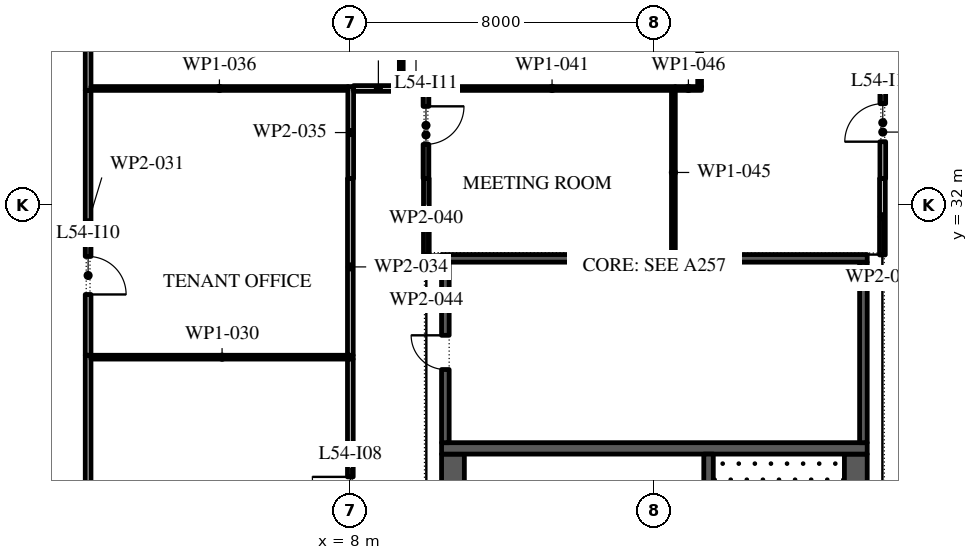
"""IFC4 building model, lengths in metres.
Left out: names, types, materials, properties, quantities, classifications, styles, units other than length and angle.
Written with IfcOpenShell. Run it as: python <this file> out.ifc"""

import sys

from ifc_helpers import new_model, si_unit, direction, frame, frame_2d, origin, place, context, subcontext, project, spatial, rectangle, extrude, element, fill, save


model = new_model("IFC4")
c1 = context("Model", 3, precision=1e-05, world=origin(), true_north=direction((0.0, 1.0)))
c2 = subcontext(c1, "Body", "Model", "MODEL_VIEW")
j1 = project(units=[si_unit("LENGTHUNIT", "METRE"), si_unit("PLANEANGLEUNIT", "RADIAN")], contexts=[c1])
p1 = place(None, origin())
s1 = spatial("IfcSite", under=j1, at=p1, CompositionType="ELEMENT")
p2 = place(p1, origin())
s2 = spatial("IfcBuilding", under=s1, at=p2, CompositionType="ELEMENT")
p3 = place(p2, frame((0.0, 0.0, 251.4)))
s3 = spatial("IfcBuildingStorey", under=s2, at=p3, CompositionType="ELEMENT", Elevation=251.4)
p4 = place(p3, frame((21.359, -11.678, 0.0), z_axis=(0.0, 0.0, 1.0), x_axis=(0.224949198343, 0.974370493275, 0.0)))
e1 = element("IfcWall", 1, at=p4, inside=s3, PredefinedType="STANDARD", context=c2, shape_type="SweptSolid", body=[
    extrude(rectangle(XDim=49.5, YDim=0.3, at=frame_2d((24.75, 0.0))), origin(), (0.0, 0.0, 1.0), 4.0),
])
p5 = place(p4, frame((1.157, 0.0, 0.45)))
e2 = element("IfcOpeningElement", 2, at=p5, cuts=e1, PredefinedType="OPENING", context=c2, shape_type="SweptSolid", body=[
    extrude(rectangle(XDim=4.5, YDim=3.05, at=frame_2d((2.25, 1.525))), frame((0.0, 0.16, 0.0), z_axis=(0.0, -1.0, 0.0), x_axis=(1.0, 0.0, 0.0)), (0.0, 0.0, 1.0), 0.32),
])
p6 = place(p4, frame((8.121, 0.0, 0.45)))
e3 = element("IfcOpeningElement", 3, at=p6, cuts=e1, PredefinedType="OPENING", context=c2, shape_type="SweptSolid", body=[
    extrude(rectangle(XDim=4.5, YDim=3.05, at=frame_2d((2.25, 1.525))), frame((0.0, 0.16, 0.0), z_axis=(0.0, -1.0, 0.0), x_axis=(1.0, 0.0, 0.0)), (0.0, 0.0, 1.0), 0.32),
])
p7 = place(p4, frame((15.236, 0.0, 0.45)))
e4 = element("IfcOpeningElement", 4, at=p7, cuts=e1, PredefinedType="OPENING", context=c2, shape_type="SweptSolid", body=[
    extrude(rectangle(XDim=4.5, YDim=3.05, at=frame_2d((2.25, 1.525))), frame((0.0, 0.16, 0.0), z_axis=(0.0, -1.0, 0.0), x_axis=(1.0, 0.0, 0.0)), (0.0, 0.0, 1.0), 0.32),
])
p8 = place(p4, frame((22.35, 0.0, 0.45)))
e5 = element("IfcOpeningElement", 5, at=p8, cuts=e1, PredefinedType="OPENING", context=c2, shape_type="SweptSolid", body=[
    extrude(rectangle(XDim=4.5, YDim=3.05, at=frame_2d((2.25, 1.525))), frame((0.0, 0.16, 0.0), z_axis=(0.0, -1.0, 0.0), x_axis=(1.0, 0.0, 0.0)), (0.0, 0.0, 1.0), 0.32),
])
p9 = place(p4, frame((29.464, 0.0, 0.45)))
e6 = element("IfcOpeningElement", 6, at=p9, cuts=e1, PredefinedType="OPENING", context=c2, shape_type="SweptSolid", body=[
    extrude(rectangle(XDim=4.5, YDim=2.95, at=frame_2d((2.25, 1.475))), frame((0.0, 0.16, 0.0), z_axis=(0.0, -1.0, 0.0), x_axis=(1.0, 0.0, 0.0)), (0.0, 0.0, 1.0), 0.32),
])
p10 = place(p4, frame((37.628, 0.0, 0.0)))
e7 = element("IfcOpeningElement", 7, at=p10, cuts=e1, PredefinedType="OPENING", context=c2, shape_type="SweptSolid", body=[
    extrude(rectangle(XDim=2.4, YDim=3.325, at=frame_2d((1.2, 1.663))), frame((0.0, 0.16, 0.0), z_axis=(0.0, -1.0, 0.0), x_axis=(1.0, 0.0, 0.0)), (0.0, 0.0, 1.0), 0.32),
])
p11 = place(p4, frame((43.693, 0.0, 0.45)))
e8 = element("IfcOpeningElement", 8, at=p11, cuts=e1, PredefinedType="OPENING", context=c2, shape_type="SweptSolid", body=[
    extrude(rectangle(XDim=4.5, YDim=3.05, at=frame_2d((2.25, 1.525))), frame((0.0, 0.16, 0.0), z_axis=(0.0, -1.0, 0.0), x_axis=(1.0, 0.0, 0.0)), (0.0, 0.0, 1.0), 0.32),
])
p12 = place(p3, frame((21.3, -2.45, 0.0), z_axis=(0.0, 0.0, 1.0), x_axis=(0.0, 1.0, 0.0)))
e9 = element("IfcWall", 9, at=p12, inside=s3, PredefinedType="SHEAR", context=c2, shape_type="SweptSolid", body=[
    extrude(rectangle(XDim=27.9, YDim=0.6, at=frame_2d((13.95, 0.0))), origin(), (0.0, 0.0, 1.0), 4.0),
])
p13 = place(p12, frame((5.05, 0.0, 0.0)))
e10 = element("IfcOpeningElement", 10, at=p13, cuts=e9, PredefinedType="OPENING", context=c2, shape_type="SweptSolid", body=[
    extrude(rectangle(XDim=1.2, YDim=2.1, at=frame_2d((0.6, 1.05))), frame((0.0, 0.31, 0.0), z_axis=(0.0, -1.0, 0.0), x_axis=(1.0, 0.0, 0.0)), (0.0, 0.0, 1.0), 0.62),
])
p14 = place(p12, frame((21.65, 0.0, 0.0)))
e11 = element("IfcOpeningElement", 11, at=p14, cuts=e9, PredefinedType="OPENING", context=c2, shape_type="SweptSolid", body=[
    extrude(rectangle(XDim=1.2, YDim=2.1, at=frame_2d((0.6, 1.05))), frame((0.0, 0.31, 0.0), z_axis=(0.0, -1.0, 0.0), x_axis=(1.0, 0.0, 0.0)), (0.0, 0.0, 1.0), 0.62),
])
p15 = place(p3, frame((10.7, -2.45, 0.0), z_axis=(0.0, 0.0, 1.0), x_axis=(0.0, 1.0, 0.0)))
e12 = element("IfcWall", 12, at=p15, inside=s3, PredefinedType="SHEAR", context=c2, shape_type="SweptSolid", body=[
    extrude(rectangle(XDim=27.9, YDim=0.6, at=frame_2d((13.95, 0.0))), origin(), (0.0, 0.0, 1.0), 4.0),
])
p16 = place(p15, frame((23.65, 0.0, 0.0)))
e13 = element("IfcOpeningElement", 13, at=p16, cuts=e12, PredefinedType="OPENING", context=c2, shape_type="SweptSolid", body=[
    extrude(rectangle(XDim=2.4, YDim=2.1, at=frame_2d((1.2, 1.05))), frame((0.0, 0.31, 0.0), z_axis=(0.0, -1.0, 0.0), x_axis=(1.0, 0.0, 0.0)), (0.0, 0.0, 1.0), 0.62),
])
p17 = place(p15, frame((0.788, 0.0, 0.0)))
e14 = element("IfcOpeningElement", 14, at=p17, cuts=e12, PredefinedType="OPENING", context=c2, shape_type="SweptSolid", body=[
    extrude(rectangle(XDim=0.9, YDim=2.1, at=frame_2d((0.45, 1.05))), frame((0.0, 0.31, 0.0), z_axis=(0.0, -1.0, 0.0), x_axis=(1.0, 0.0, 0.0)), (0.0, 0.0, 1.0), 0.62),
])
p18 = place(p15, frame((3.962, 0.0, 0.0)))
e15 = element("IfcOpeningElement", 15, at=p18, cuts=e12, PredefinedType="OPENING", context=c2, shape_type="SweptSolid", body=[
    extrude(rectangle(XDim=1.0, YDim=2.1, at=frame_2d((0.5, 1.05))), frame((0.0, 0.31, 0.0), z_axis=(0.0, -1.0, 0.0), x_axis=(1.0, 0.0, 0.0)), (0.0, 0.0, 1.0), 0.62),
])
p19 = place(p3, frame((10.4, 25.6, 0.0), z_axis=(0.0, 0.0, 1.0), x_axis=(1.0, 0.0, 0.0)))
e16 = element("IfcWall", 16, at=p19, inside=s3, PredefinedType="SHEAR", context=c2, shape_type="SweptSolid", body=[
    extrude(rectangle(XDim=11.2, YDim=0.3, at=frame_2d((5.6, 0.0))), origin(), (0.0, 0.0, 1.0), 4.0),
])
p20 = place(p3, frame((17.425, 19.15, 0.0), z_axis=(0.0, 0.0, 1.0), x_axis=(0.0, 1.0, 0.0)))
e17 = element("IfcWall", 17, at=p20, inside=s3, PredefinedType="SHEAR", context=c2, shape_type="SweptSolid", body=[
    extrude(rectangle(XDim=6.3, YDim=0.25, at=frame_2d((3.15, 0.0))), origin(), (0.0, 0.0, 1.0), 4.0),
])
p21 = place(p20, frame((0.05, 0.0, 0.0)))
e18 = element("IfcOpeningElement", 18, at=p21, cuts=e17, PredefinedType="OPENING", context=c2, shape_type="SweptSolid", body=[
    extrude(rectangle(XDim=1.2, YDim=2.1, at=frame_2d((0.6, 1.05))), frame((0.0, 0.135, 0.0), z_axis=(0.0, -1.0, 0.0), x_axis=(1.0, 0.0, 0.0)), (0.0, 0.0, 1.0), 0.27),
])
p22 = place(p3, frame((21.5, 25.75, 0.0), z_axis=(0.0, 0.0, 1.0), x_axis=(0.0, 1.0, 0.0)))
e19 = element("IfcWall", 19, at=p22, inside=s3, PredefinedType="SHEAR", context=c2, shape_type="SweptSolid", body=[
    extrude(rectangle(XDim=4.75, YDim=0.2, at=frame_2d((2.375, 0.0))), origin(), (0.0, 0.0, 1.0), 4.0),
])
p23 = place(p3, frame((10.5, 25.75, 0.0), z_axis=(0.0, 0.0, 1.0), x_axis=(0.0, 1.0, 0.0)))
e20 = element("IfcWall", 20, at=p23, inside=s3, PredefinedType="SHEAR", context=c2, shape_type="SweptSolid", body=[
    extrude(rectangle(XDim=4.75, YDim=0.2, at=frame_2d((2.375, 0.0))), origin(), (0.0, 0.0, 1.0), 4.0),
])
p24 = place(p23, frame((1.925, 0.0, 0.0)))
e21 = element("IfcOpeningElement", 21, at=p24, cuts=e20, PredefinedType="OPENING", context=c2, shape_type="SweptSolid", body=[
    extrude(rectangle(XDim=0.9, YDim=2.1, at=frame_2d((0.45, 1.05))), frame((0.0, 0.11, 0.0), z_axis=(0.0, -1.0, 0.0), x_axis=(1.0, 0.0, 0.0)), (0.0, 0.0, 1.0), 0.22),
])
p25 = place(p3, frame((10.4, 30.6, 0.0), z_axis=(0.0, 0.0, 1.0), x_axis=(1.0, 0.0, 0.0)))
e22 = element("IfcWall", 22, at=p25, inside=s3, PredefinedType="SHEAR", context=c2, shape_type="SweptSolid", body=[
    extrude(rectangle(XDim=11.2, YDim=0.2, at=frame_2d((5.6, 0.0))), origin(), (0.0, 0.0, 1.0), 4.0),
])
p26 = place(p3, frame((1.1, 28.05, 0.0), z_axis=(0.0, 0.0, 1.0), x_axis=(0.0, -1.0, 0.0)))
e23 = element("IfcWall", 23, at=p26, inside=s3, PredefinedType="PARTITIONING", context=c2, shape_type="SweptSolid", body=[
    extrude(rectangle(XDim=8.975, YDim=0.15, at=frame_2d((4.488, 0.0))), origin(), (0.0, 0.0, 1.0), 4.0),
])
p27 = place(p3, frame((1.175, 28.0, 0.0), z_axis=(0.0, 0.0, 1.0), x_axis=(1.0, 0.0, 0.0)))
e24 = element("IfcWall", 24, at=p27, inside=s3, PredefinedType="PARTITIONING", context=c2, shape_type="SweptSolid", body=[
    extrude(rectangle(XDim=6.9, YDim=0.1, at=frame_2d((3.45, 0.0))), origin(), (0.0, 0.0, 1.0), 4.0),
])
p28 = place(p3, frame((1.1, 35.02, 0.0), z_axis=(0.0, 0.0, 1.0), x_axis=(0.0, -1.0, 0.0)))
e25 = element("IfcWall", 25, at=p28, inside=s3, PredefinedType="PARTITIONING", context=c2, shape_type="SweptSolid", body=[
    extrude(rectangle(XDim=6.97, YDim=0.15, at=frame_2d((3.485, 0.0))), origin(), (0.0, 0.0, 1.0), 4.0),
])
p29 = place(p28, frame((4.37, 0.0, 0.0)))
e26 = element("IfcOpeningElement", 26, at=p29, cuts=e25, PredefinedType="OPENING", context=c2, shape_type="SweptSolid", body=[
    extrude(rectangle(XDim=1.0, YDim=2.1, at=frame_2d((0.5, 1.05))), frame((0.0, 0.085, 0.0), z_axis=(0.0, -1.0, 0.0), x_axis=(1.0, 0.0, 0.0)), (0.0, 0.0, 1.0), 0.17),
])
p30 = place(p3, frame((1.1, 47.27, 0.0), z_axis=(0.0, 0.0, 1.0), x_axis=(0.0, -1.0, 0.0)))
e27 = element("IfcWall", 27, at=p30, inside=s3, PredefinedType="PARTITIONING", context=c2, shape_type="SweptSolid", body=[
    extrude(rectangle(XDim=12.25, YDim=0.15, at=frame_2d((6.125, 0.0))), origin(), (0.0, 0.0, 1.0), 4.0),
])
p31 = place(p30, frame((8.05, 0.0, 0.0)))
e28 = element("IfcOpeningElement", 28, at=p31, cuts=e27, PredefinedType="OPENING", context=c2, shape_type="SweptSolid", body=[
    extrude(rectangle(XDim=1.0, YDim=2.1, at=frame_2d((0.5, 1.05))), frame((0.0, 0.085, 0.0), z_axis=(0.0, -1.0, 0.0), x_axis=(1.0, 0.0, 0.0)), (0.0, 0.0, 1.0), 0.17),
])
p32 = place(p3, frame((8.0, 19.075, 0.0), z_axis=(0.0, 0.0, 1.0), x_axis=(0.0, 1.0, 0.0)))
e29 = element("IfcWall", 29, at=p32, inside=s3, PredefinedType="PARTITIONING", context=c2, shape_type="SweptSolid", body=[
    extrude(rectangle(XDim=8.875, YDim=0.15, at=frame_2d((4.438, 0.0))), origin(), (0.0, 0.0, 1.0), 4.0),
])
p33 = place(p32, frame((4.775, 0.0, 0.0)))
e30 = element("IfcOpeningElement", 30, at=p33, cuts=e29, PredefinedType="OPENING", context=c2, shape_type="SweptSolid", body=[
    extrude(rectangle(XDim=1.0, YDim=2.1, at=frame_2d((0.5, 1.05))), frame((0.0, 0.085, 0.0), z_axis=(0.0, -1.0, 0.0), x_axis=(1.0, 0.0, 0.0)), (0.0, 0.0, 1.0), 0.17),
])
p34 = place(p3, frame((8.0, 28.05, 0.0), z_axis=(0.0, 0.0, 1.0), x_axis=(0.0, 1.0, 0.0)))
e31 = element("IfcWall", 31, at=p34, inside=s3, PredefinedType="PARTITIONING", context=c2, shape_type="SweptSolid", body=[
    extrude(rectangle(XDim=4.65, YDim=0.15, at=frame_2d((2.325, 0.0))), origin(), (0.0, 0.0, 1.0), 4.0),
])
p35 = place(p3, frame((8.01, 32.7, 0.0), z_axis=(0.0, 0.0, 1.0), x_axis=(0.0, 1.0, 0.0)))
e32 = element("IfcWall", 32, at=p35, inside=s3, PredefinedType="PARTITIONING", context=c2, shape_type="SweptSolid", body=[
    extrude(rectangle(XDim=2.42, YDim=0.15, at=frame_2d((1.21, 0.0))), origin(), (0.0, 0.0, 1.0), 4.0),
])
p36 = place(p3, frame((7.935, 35.07, 0.0), z_axis=(0.0, 0.0, 1.0), x_axis=(-1.0, 0.0, 0.0)))
e33 = element("IfcWall", 33, at=p36, inside=s3, PredefinedType="PARTITIONING", context=c2, shape_type="SweptSolid", body=[
    extrude(rectangle(XDim=6.76, YDim=0.1, at=frame_2d((3.38, 0.0))), origin(), (0.0, 0.0, 1.0), 4.0),
])
p37 = place(p3, frame((8.085, 35.07, 0.0), z_axis=(0.0, 0.0, 1.0), x_axis=(1.0, 0.0, 0.0)))
e34 = element("IfcWall", 34, at=p37, inside=s3, PredefinedType="PARTITIONING", context=c2, shape_type="SweptSolid", body=[
    extrude(rectangle(XDim=1.305, YDim=0.15, at=frame_2d((0.652, 0.0))), origin(), (0.0, 0.0, 1.0), 4.0),
])
p38 = place(p3, frame((9.39, 35.07, 0.0), z_axis=(0.0, 0.0, 1.0), x_axis=(1.0, 0.0, 0.0)))
e35 = element("IfcWall", 35, at=p38, inside=s3, PredefinedType="PARTITIONING", context=c2, shape_type="SweptSolid", body=[
    extrude(rectangle(XDim=0.675, YDim=0.15, at=frame_2d((0.337, 0.0))), origin(), (0.0, 0.0, 1.0), 4.0),
])
p39 = place(p3, frame((9.34, 45.368, 0.0), z_axis=(0.0, 0.0, 1.0), x_axis=(0.0, -1.0, 0.0)))
e36 = element("IfcWall", 36, at=p39, inside=s3, PredefinedType="PARTITIONING", context=c2, shape_type="SweptSolid", body=[
    extrude(rectangle(XDim=10.223, YDim=0.1, at=frame_2d((5.111, 0.0))), origin(), (0.0, 0.0, 1.0), 4.0),
])
p40 = place(p39, frame((6.698, 0.0, 0.0)))
e37 = element("IfcOpeningElement", 37, at=p40, cuts=e36, PredefinedType="OPENING", context=c2, shape_type="SweptSolid", body=[
    extrude(rectangle(XDim=0.9, YDim=2.1, at=frame_2d((0.45, 1.05))), frame((0.0, 0.06, 0.0), z_axis=(0.0, -1.0, 0.0), x_axis=(1.0, 0.0, 0.0)), (0.0, 0.0, 1.0), 0.12),
])
p41 = place(p3, frame((9.99, 34.995, 0.0), z_axis=(0.0, 0.0, 1.0), x_axis=(0.0, -1.0, 0.0)))
e38 = element("IfcWall", 38, at=p41, inside=s3, PredefinedType="PARTITIONING", context=c2, shape_type="SweptSolid", body=[
    extrude(rectangle(XDim=2.295, YDim=0.15, at=frame_2d((1.147, 0.0))), origin(), (0.0, 0.0, 1.0), 4.0),
])
p42 = place(p41, frame((0.395, 0.0, 0.0)))
e39 = element("IfcOpeningElement", 39, at=p42, cuts=e38, PredefinedType="OPENING", context=c2, shape_type="SweptSolid", body=[
    extrude(rectangle(XDim=1.0, YDim=2.1, at=frame_2d((0.5, 1.05))), frame((0.0, 0.085, 0.0), z_axis=(0.0, -1.0, 0.0), x_axis=(1.0, 0.0, 0.0)), (0.0, 0.0, 1.0), 0.17),
])
p43 = place(p3, frame((10.065, 35.07, 0.0), z_axis=(0.0, 0.0, 1.0), x_axis=(1.0, 0.0, 0.0)))
e40 = element("IfcWall", 40, at=p43, inside=s3, PredefinedType="PARTITIONING", context=c2, shape_type="SweptSolid", body=[
    extrude(rectangle(XDim=6.485, YDim=0.1, at=frame_2d((3.243, 0.0))), origin(), (0.0, 0.0, 1.0), 4.0),
])
p44 = place(p3, frame((10.0, 32.7, 0.0), z_axis=(0.0, 0.0, 1.0), x_axis=(0.0, -1.0, 0.0)))
e41 = element("IfcWall", 41, at=p44, inside=s3, PredefinedType="PARTITIONING", context=c2, shape_type="SweptSolid", body=[
    extrude(rectangle(XDim=2.0, YDim=0.15, at=frame_2d((1.0, 0.0))), origin(), (0.0, 0.0, 1.0), 4.0),
])
p45 = place(p3, frame((16.5, 35.02, 0.0), z_axis=(0.0, 0.0, 1.0), x_axis=(0.0, -1.0, 0.0)))
e42 = element("IfcWall", 42, at=p45, inside=s3, PredefinedType="PARTITIONING", context=c2, shape_type="SweptSolid", body=[
    extrude(rectangle(XDim=4.32, YDim=0.1, at=frame_2d((2.16, 0.0))), origin(), (0.0, 0.0, 1.0), 4.0),
])
p46 = place(p3, frame((17.24, 35.07, 0.0), z_axis=(0.0, 0.0, 1.0), x_axis=(-1.0, 0.0, 0.0)))
e43 = element("IfcWall", 43, at=p46, inside=s3, PredefinedType="PARTITIONING", context=c2, shape_type="SweptSolid", body=[
    extrude(rectangle(XDim=0.69, YDim=0.1, at=frame_2d((0.345, 0.0))), origin(), (0.0, 0.0, 1.0), 4.0),
])
p47 = place(p3, frame((17.19, 43.556, 0.0), z_axis=(0.0, 0.0, 1.0), x_axis=(0.0, -1.0, 0.0)))
e44 = element("IfcWall", 44, at=p47, inside=s3, PredefinedType="PARTITIONING", context=c2, shape_type="SweptSolid", body=[
    extrude(rectangle(XDim=8.436, YDim=0.1, at=frame_2d((4.218, 0.0))), origin(), (0.0, 0.0, 1.0), 4.0),
])
p48 = place(p3, frame((22.0, 30.69, 0.0), z_axis=(0.0, 0.0, 1.0), x_axis=(0.0, 1.0, 0.0)))
e45 = element("IfcWall", 45, at=p48, inside=s3, PredefinedType="PARTITIONING", context=c2, shape_type="SweptSolid", body=[
    extrude(rectangle(XDim=2.01, YDim=0.15, at=frame_2d((1.005, 0.0))), origin(), (0.0, 0.0, 1.0), 4.0),
])
p49 = place(p3, frame((22.01, 32.7, 0.0), z_axis=(0.0, 0.0, 1.0), x_axis=(0.0, 1.0, 0.0)))
e46 = element("IfcWall", 46, at=p49, inside=s3, PredefinedType="PARTITIONING", context=c2, shape_type="SweptSolid", body=[
    extrude(rectangle(XDim=2.445, YDim=0.15, at=frame_2d((1.223, 0.0))), origin(), (0.0, 0.0, 1.0), 4.0),
])
p50 = place(p49, frame((0.97, 0.0, 0.0)))
e47 = element("IfcOpeningElement", 47, at=p50, cuts=e46, PredefinedType="OPENING", context=c2, shape_type="SweptSolid", body=[
    extrude(rectangle(XDim=1.0, YDim=2.1, at=frame_2d((0.5, 1.05))), frame((0.0, 0.085, 0.0), z_axis=(0.0, -1.0, 0.0), x_axis=(1.0, 0.0, 0.0)), (0.0, 0.0, 1.0), 0.17),
])
p51 = place(p3, frame((22.085, 35.07, 0.0), z_axis=(0.0, 0.0, 1.0), x_axis=(1.0, 0.0, 0.0)))
e48 = element("IfcWall", 48, at=p51, inside=s3, PredefinedType="PARTITIONING", context=c2, shape_type="SweptSolid", body=[
    extrude(rectangle(XDim=1.98, YDim=0.15, at=frame_2d((0.99, 0.0))), origin(), (0.0, 0.0, 1.0), 4.0),
])
p52 = place(p24, origin())
e49 = element("IfcDoor", 49, at=p52, inside=s3, OperationType="SINGLE_SWING_LEFT", PredefinedType="DOOR", context=c2, shape_type="SweptSolid", body=[
    extrude(rectangle(XDim=0.9, YDim=2.1, at=frame_2d((0.45, 1.05))), frame((0.0, -0.05, 0.0), z_axis=(0.0, -1.0, 0.0), x_axis=(1.0, 0.0, 0.0)), (0.0, 0.0, 1.0), 0.05),
])
fill(e21, e49)
p53 = place(p33, origin())
e50 = element("IfcDoor", 50, at=p53, inside=s3, OperationType="SINGLE_SWING_LEFT", PredefinedType="DOOR", context=c2, shape_type="SweptSolid", body=[
    extrude(rectangle(XDim=1.0, YDim=2.1, at=frame_2d((0.5, 1.05))), frame((0.0, 0.025, 0.0), z_axis=(0.0, -1.0, 0.0), x_axis=(1.0, 0.0, 0.0)), (0.0, 0.0, 1.0), 0.05),
])
fill(e30, e50)
p54 = place(p29, origin())
e51 = element("IfcDoor", 51, at=p54, inside=s3, OperationType="SINGLE_SWING_LEFT", PredefinedType="DOOR", context=c2, shape_type="SweptSolid", body=[
    extrude(rectangle(XDim=1.0, YDim=2.1, at=frame_2d((0.5, 1.05))), frame((0.0, 0.025, 0.0), z_axis=(0.0, -1.0, 0.0), x_axis=(1.0, 0.0, 0.0)), (0.0, 0.0, 1.0), 0.05),
])
fill(e26, e51)
p55 = place(p42, origin())
e52 = element("IfcDoor", 52, at=p55, inside=s3, OperationType="SINGLE_SWING_RIGHT", PredefinedType="DOOR", context=c2, shape_type="SweptSolid", body=[
    extrude(rectangle(XDim=1.0, YDim=2.1, at=frame_2d((0.5, 1.05))), frame((0.0, 0.025, 0.0), z_axis=(0.0, -1.0, 0.0), x_axis=(1.0, 0.0, 0.0)), (0.0, 0.0, 1.0), 0.05),
])
fill(e39, e52)
p56 = place(p50, origin())
e53 = element("IfcDoor", 53, at=p56, inside=s3, OperationType="SINGLE_SWING_RIGHT", PredefinedType="DOOR", context=c2, shape_type="SweptSolid", body=[
    extrude(rectangle(XDim=1.0, YDim=2.1, at=frame_2d((0.5, 1.05))), frame((0.0, 0.025, 0.0), z_axis=(0.0, -1.0, 0.0), x_axis=(1.0, 0.0, 0.0)), (0.0, 0.0, 1.0), 0.05),
])
fill(e47, e53)
save(model, sys.argv[1])
